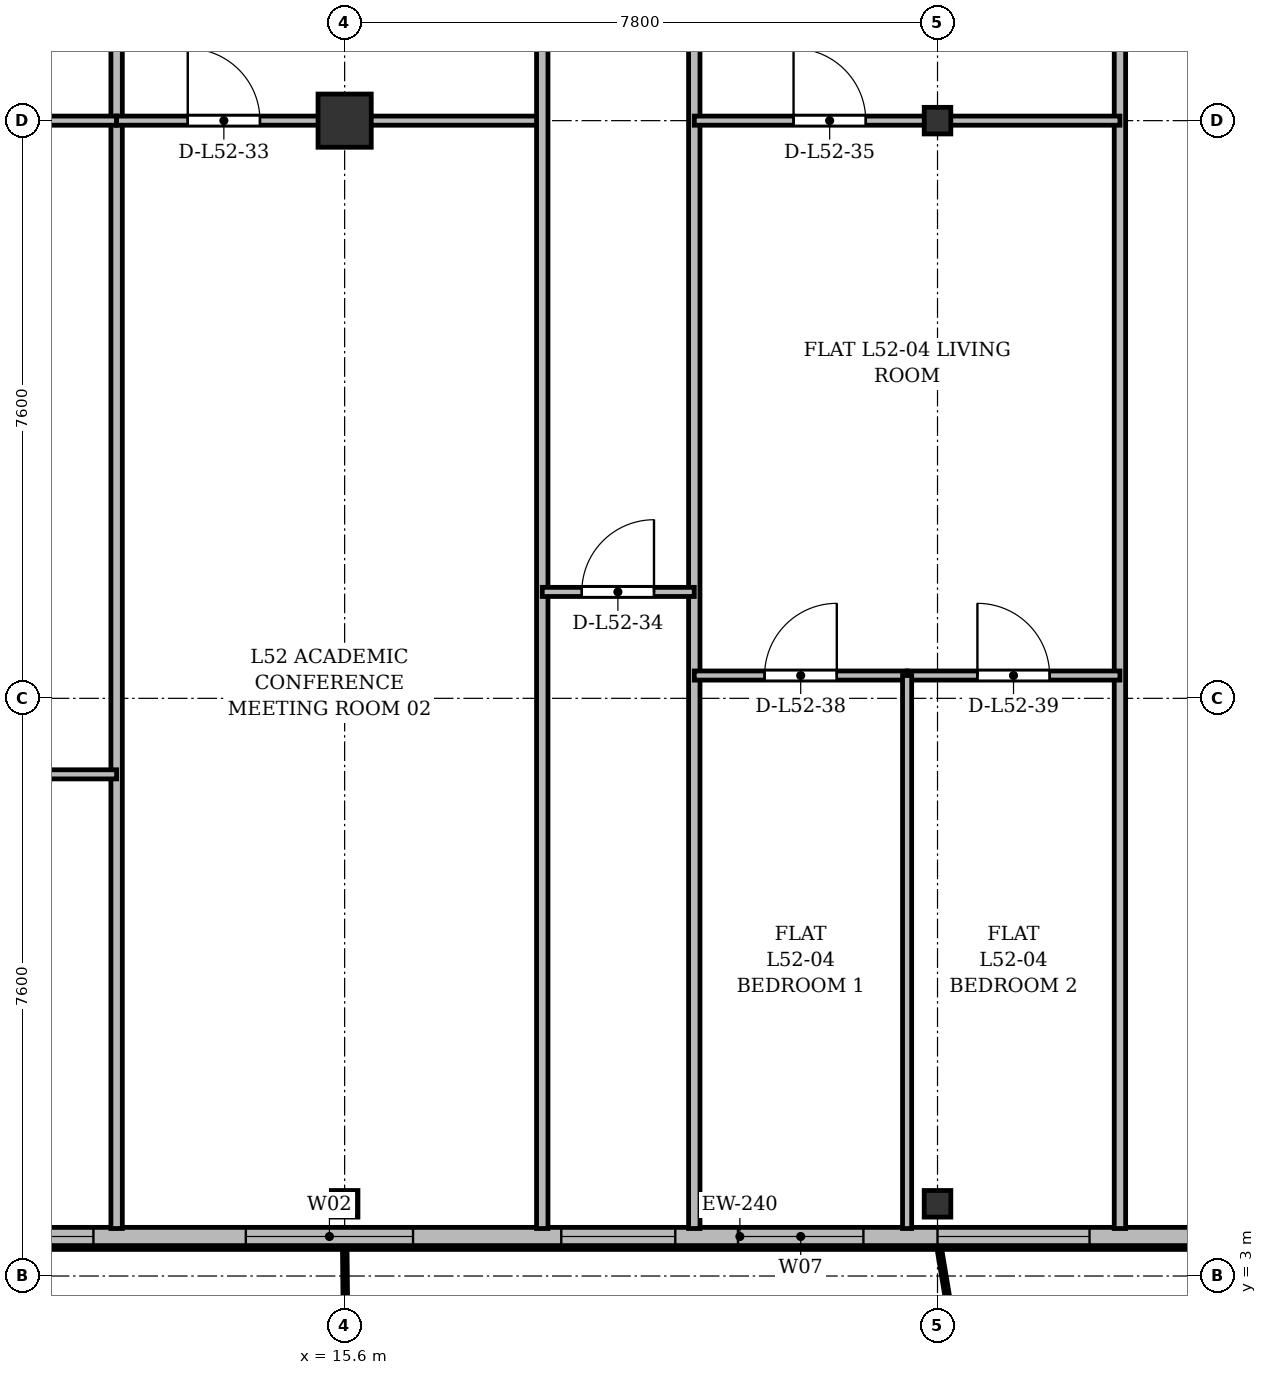
"""IFC4 building model, lengths in metres.
Left out: names, types, materials, properties, quantities, classifications, styles, units other than length and angle.
Written with IfcOpenShell. Run it as: python <this file> out.ifc"""

import sys

from ifc_helpers import new_model, si_unit, direction, frame, frame_2d, origin, origin_2d, place, context, subcontext, project, spatial, rectangle, i_section, extrude, source, transform, mapped, element, fill, save


model = new_model("IFC4")
c1 = context("Model", 3, precision=1e-05, world=origin(), true_north=direction((0.0, 1.0)))
c2 = subcontext(c1, "Body", "Model", "MODEL_VIEW")
j1 = project(units=[si_unit("LENGTHUNIT", "METRE"), si_unit("PLANEANGLEUNIT", "RADIAN")], contexts=[c1])
p1 = place(None, origin())
s1 = spatial("IfcSite", under=j1, at=p1, CompositionType="ELEMENT")
p2 = place(p1, origin())
s2 = spatial("IfcBuilding", under=s1, at=p2, CompositionType="ELEMENT")
p3 = place(p2, frame((0.0, 0.0, 201.3)))
s3 = spatial("IfcBuildingStorey", under=s2, at=p3, CompositionType="ELEMENT", Elevation=201.3)
m1 = source(origin(), c2, "Body", "SweptSolid", [
    extrude(i_section(OverallWidth=0.35, OverallDepth=0.35, WebThickness=0.018, FlangeThickness=0.028, at=origin_2d()), origin(), (0.0, 0.0, 1.0), 3.6),
])
p4 = place(p3, frame((15.6, 3.95, 0.0), z_axis=(0.0, 0.0, 1.0), x_axis=(1.0, 0.0, 0.0)))
e1 = element("IfcColumn", 1, at=p4, inside=s3, PredefinedType="COLUMN", context=c2, shape_type="MappedRepresentation", body=[
    mapped(m1, transform((0.0, 0.0, 0.0), x_axis=(1.0, 0.0, 0.0), y_axis=(0.0, 1.0, 0.0), z_axis=(0.0, 0.0, 1.0), scale=1.0)),
])
m2 = source(origin(), c2, "Body", "SweptSolid", [
    extrude(rectangle(XDim=0.7, YDim=0.7, at=origin_2d()), origin(), (0.0, 0.0, 1.0), 3.6),
])
p5 = place(p3, frame((15.6, 18.2, 0.0), z_axis=(0.0, 0.0, 1.0), x_axis=(1.0, 0.0, 0.0)))
e2 = element("IfcColumn", 2, at=p5, inside=s3, PredefinedType="COLUMN", context=c2, shape_type="MappedRepresentation", body=[
    mapped(m2, transform((0.0, 0.0, 0.0), x_axis=(1.0, 0.0, 0.0), y_axis=(0.0, 1.0, 0.0), z_axis=(0.0, 0.0, 1.0), scale=1.0)),
])
for number, where, z_axis, x_axis in (
    (3, (23.4, 3.95, 0.0), (0.0, 0.0, 1.0), (1.0, 0.0, 0.0)),
    (4, (23.4, 18.2, 0.0), (0.0, 0.0, 1.0), (1.0, 0.0, 0.0)),
):
    element("IfcColumn", number, at=place(p3, frame(where, z_axis=z_axis, x_axis=x_axis)), inside=s3, PredefinedType="COLUMN", context=c2, shape_type="MappedRepresentation", body=[
        mapped(m1, transform((0.0, 0.0, 0.0), x_axis=(1.0, 0.0, 0.0), y_axis=(0.0, 1.0, 0.0), z_axis=(0.0, 0.0, 1.0), scale=1.0)),
    ])
p6 = place(p3, frame((30.6, 3.52, 0.0), z_axis=(0.0, 0.0, 1.0), x_axis=(-1.0, 0.0, 0.0)))
e5 = element("IfcWall", 5, at=p6, inside=s3, PredefinedType="SOLIDWALL", context=c2, shape_type="SweptSolid", body=[
    extrude(rectangle(XDim=19.6, YDim=0.24, at=frame_2d((9.8, 0.0))), origin(), (0.0, 0.0, 1.0), 3.22),
])
p7 = place(p6, frame((1.695, 0.0, 0.9)))
e6 = element("IfcOpeningElement", 6, at=p7, cuts=e5, PredefinedType="OPENING", context=c2, shape_type="SweptSolid", body=[
    extrude(rectangle(XDim=1.5, YDim=1.75, at=frame_2d((0.75, 0.875))), frame((0.0, 0.13, 0.0), z_axis=(0.0, -1.0, 0.0), x_axis=(1.0, 0.0, 0.0)), (0.0, 0.0, 1.0), 0.26),
])
p8 = place(p6, frame((5.2, 0.0, 0.9)))
e7 = element("IfcOpeningElement", 7, at=p8, cuts=e5, PredefinedType="OPENING", context=c2, shape_type="SweptSolid", body=[
    extrude(rectangle(XDim=2.0, YDim=1.95, at=frame_2d((1.0, 0.975))), frame((0.0, 0.13, 0.0), z_axis=(0.0, -1.0, 0.0), x_axis=(1.0, 0.0, 0.0)), (0.0, 0.0, 1.0), 0.26),
])
p9 = place(p6, frame((8.175, 0.0, 0.9)))
e8 = element("IfcOpeningElement", 8, at=p9, cuts=e5, PredefinedType="OPENING", context=c2, shape_type="SweptSolid", body=[
    extrude(rectangle(XDim=1.65, YDim=1.85, at=frame_2d((0.825, 0.925))), frame((0.0, 0.13, 0.0), z_axis=(0.0, -1.0, 0.0), x_axis=(1.0, 0.0, 0.0)), (0.0, 0.0, 1.0), 0.26),
])
p10 = place(p6, frame((10.65, 0.0, 0.9)))
e9 = element("IfcOpeningElement", 9, at=p10, cuts=e5, PredefinedType="OPENING", context=c2, shape_type="SweptSolid", body=[
    extrude(rectangle(XDim=1.5, YDim=1.75, at=frame_2d((0.75, 0.875))), frame((0.0, 0.13, 0.0), z_axis=(0.0, -1.0, 0.0), x_axis=(1.0, 0.0, 0.0)), (0.0, 0.0, 1.0), 0.26),
])
p11 = place(p6, frame((14.1, 0.0, 0.9)))
e10 = element("IfcOpeningElement", 10, at=p11, cuts=e5, PredefinedType="OPENING", context=c2, shape_type="SweptSolid", body=[
    extrude(rectangle(XDim=2.2, YDim=1.8, at=frame_2d((1.1, 0.9))), frame((0.0, 0.13, 0.0), z_axis=(0.0, -1.0, 0.0), x_axis=(1.0, 0.0, 0.0)), (0.0, 0.0, 1.0), 0.26),
])
p12 = place(p6, frame((18.305, 0.0, 0.9)))
e11 = element("IfcOpeningElement", 11, at=p12, cuts=e5, PredefinedType="OPENING", context=c2, shape_type="SweptSolid", body=[
    extrude(rectangle(XDim=0.9, YDim=1.65, at=frame_2d((0.45, 0.825))), frame((0.0, 0.13, 0.0), z_axis=(0.0, -1.0, 0.0), x_axis=(1.0, 0.0, 0.0)), (0.0, 0.0, 1.0), 0.26),
])
for number, where, z_axis, x_axis in (
    (12, (12.6, 3.625, 0.0), (0.0, 0.0, 1.0), (0.0, 1.0, 0.0)),
    (13, (25.8, 3.625, 0.0), (0.0, 0.0, 1.0), (0.0, 1.0, 0.0)),
):
    element("IfcWall", number, at=place(p3, frame(where, z_axis=z_axis, x_axis=x_axis)), inside=s3, PredefinedType="PARTITIONING", context=c2, shape_type="SweptSolid", body=[
        extrude(rectangle(XDim=27.175, YDim=0.15, at=frame_2d((13.587, 0.0))), origin(), (0.0, 0.0, 1.0), 2.77),
    ])
p13 = place(p3, frame((8.24, 18.2, 0.0), z_axis=(0.0, 0.0, 1.0), x_axis=(1.0, 0.0, 0.0)))
e14 = element("IfcWall", 14, at=p13, inside=s3, PredefinedType="PARTITIONING", context=c2, shape_type="SweptSolid", body=[
    extrude(rectangle(XDim=4.36, YDim=0.12, at=frame_2d((2.18, 0.0))), origin(), (0.0, 0.0, 1.0), 2.77),
])
p14 = place(p13, frame((1.705, 0.0, 0.0)))
e15 = element("IfcOpeningElement", 15, at=p14, cuts=e14, PredefinedType="OPENING", context=c2, shape_type="SweptSolid", body=[
    extrude(rectangle(XDim=0.95, YDim=2.15, at=frame_2d((0.475, 1.075))), frame((0.0, 0.07, 0.0), z_axis=(0.0, -1.0, 0.0), x_axis=(1.0, 0.0, 0.0)), (0.0, 0.0, 1.0), 0.14),
])
p15 = place(p3, frame((8.24, 9.6, 0.0), z_axis=(0.0, 0.0, 1.0), x_axis=(1.0, 0.0, 0.0)))
e16 = element("IfcWall", 16, at=p15, inside=s3, PredefinedType="PARTITIONING", context=c2, shape_type="SweptSolid", body=[
    extrude(rectangle(XDim=4.36, YDim=0.12, at=frame_2d((2.18, 0.0))), origin(), (0.0, 0.0, 1.0), 2.72),
])
p16 = place(p15, frame((1.705, 0.0, 0.0)))
e17 = element("IfcOpeningElement", 17, at=p16, cuts=e16, PredefinedType="OPENING", context=c2, shape_type="SweptSolid", body=[
    extrude(rectangle(XDim=0.95, YDim=2.15, at=frame_2d((0.475, 1.075))), frame((0.0, 0.07, 0.0), z_axis=(0.0, -1.0, 0.0), x_axis=(1.0, 0.0, 0.0)), (0.0, 0.0, 1.0), 0.14),
])
p17 = place(p3, frame((12.6, 18.2, 0.0), z_axis=(0.0, 0.0, 1.0), x_axis=(1.0, 0.0, 0.0)))
e18 = element("IfcWall", 18, at=p17, inside=s3, PredefinedType="PARTITIONING", context=c2, shape_type="SweptSolid", body=[
    extrude(rectangle(XDim=5.6, YDim=0.12, at=frame_2d((2.8, 0.0))), origin(), (0.0, 0.0, 1.0), 2.77),
])
p18 = place(p17, frame((0.936, 0.0, 0.0)))
e19 = element("IfcOpeningElement", 19, at=p18, cuts=e18, PredefinedType="OPENING", context=c2, shape_type="SweptSolid", body=[
    extrude(rectangle(XDim=0.95, YDim=2.15, at=frame_2d((0.475, 1.075))), frame((0.0, 0.07, 0.0), z_axis=(0.0, -1.0, 0.0), x_axis=(1.0, 0.0, 0.0)), (0.0, 0.0, 1.0), 0.14),
])
for number, where, z_axis, x_axis in (
    (20, (18.2, 3.625, 0.0), (0.0, 0.0, 1.0), (0.0, 1.0, 0.0)),
    (21, (20.2, 3.625, 0.0), (0.0, 0.0, 1.0), (0.0, 1.0, 0.0)),
):
    element("IfcWall", number, at=place(p3, frame(where, z_axis=z_axis, x_axis=x_axis)), inside=s3, PredefinedType="PARTITIONING", context=c2, shape_type="SweptSolid", body=[
        extrude(rectangle(XDim=27.175, YDim=0.15, at=frame_2d((13.587, 0.0))), origin(), (0.0, 0.0, 1.0), 2.77),
    ])
p19 = place(p3, frame((18.2, 12.0, 0.0), z_axis=(0.0, 0.0, 1.0), x_axis=(1.0, 0.0, 0.0)))
e22 = element("IfcWall", 22, at=p19, inside=s3, PredefinedType="PARTITIONING", context=c2, shape_type="SweptSolid", body=[
    extrude(rectangle(XDim=2.0, YDim=0.12, at=frame_2d((1.0, 0.0))), origin(), (0.0, 0.0, 1.0), 3.22),
])
p20 = place(p19, frame((0.52, 0.0, 0.0)))
e23 = element("IfcOpeningElement", 23, at=p20, cuts=e22, PredefinedType="OPENING", context=c2, shape_type="SweptSolid", body=[
    extrude(rectangle(XDim=0.95, YDim=2.15, at=frame_2d((0.475, 1.075))), frame((0.0, 0.07, 0.0), z_axis=(0.0, -1.0, 0.0), x_axis=(1.0, 0.0, 0.0)), (0.0, 0.0, 1.0), 0.14),
])
p21 = place(p3, frame((20.2, 18.2, 0.0), z_axis=(0.0, 0.0, 1.0), x_axis=(1.0, 0.0, 0.0)))
e24 = element("IfcWall", 24, at=p21, inside=s3, PredefinedType="PARTITIONING", context=c2, shape_type="SweptSolid", body=[
    extrude(rectangle(XDim=5.6, YDim=0.12, at=frame_2d((2.8, 0.0))), origin(), (0.0, 0.0, 1.0), 2.77),
])
p22 = place(p21, frame((1.306, 0.0, 0.0)))
e25 = element("IfcOpeningElement", 25, at=p22, cuts=e24, PredefinedType="OPENING", context=c2, shape_type="SweptSolid", body=[
    extrude(rectangle(XDim=0.95, YDim=2.15, at=frame_2d((0.475, 1.075))), frame((0.0, 0.07, 0.0), z_axis=(0.0, -1.0, 0.0), x_axis=(1.0, 0.0, 0.0)), (0.0, 0.0, 1.0), 0.14),
])
p23 = place(p3, frame((20.2, 10.9, 0.0), z_axis=(0.0, 0.0, 1.0), x_axis=(1.0, 0.0, 0.0)))
e26 = element("IfcWall", 26, at=p23, inside=s3, PredefinedType="PARTITIONING", context=c2, shape_type="SweptSolid", body=[
    extrude(rectangle(XDim=2.8, YDim=0.12, at=frame_2d((1.4, 0.0))), origin(), (0.0, 0.0, 1.0), 2.92),
])
p24 = place(p23, frame((0.925, 0.0, 0.0)))
e27 = element("IfcOpeningElement", 27, at=p24, cuts=e26, PredefinedType="OPENING", context=c2, shape_type="SweptSolid", body=[
    extrude(rectangle(XDim=0.95, YDim=2.15, at=frame_2d((0.475, 1.075))), frame((0.0, 0.07, 0.0), z_axis=(0.0, -1.0, 0.0), x_axis=(1.0, 0.0, 0.0)), (0.0, 0.0, 1.0), 0.14),
])
p25 = place(p3, frame((23.0, 10.9, 0.0), z_axis=(0.0, 0.0, 1.0), x_axis=(1.0, 0.0, 0.0)))
e28 = element("IfcWall", 28, at=p25, inside=s3, PredefinedType="PARTITIONING", context=c2, shape_type="SweptSolid", body=[
    extrude(rectangle(XDim=2.8, YDim=0.12, at=frame_2d((1.4, 0.0))), origin(), (0.0, 0.0, 1.0), 2.72),
])
p26 = place(p25, frame((0.925, 0.0, 0.0)))
e29 = element("IfcOpeningElement", 29, at=p26, cuts=e28, PredefinedType="OPENING", context=c2, shape_type="SweptSolid", body=[
    extrude(rectangle(XDim=0.95, YDim=2.15, at=frame_2d((0.475, 1.075))), frame((0.0, 0.07, 0.0), z_axis=(0.0, -1.0, 0.0), x_axis=(1.0, 0.0, 0.0)), (0.0, 0.0, 1.0), 0.14),
])
p27 = place(p3, frame((23.0, 3.625, 0.0), z_axis=(0.0, 0.0, 1.0), x_axis=(0.0, 1.0, 0.0)))
e30 = element("IfcWall", 30, at=p27, inside=s3, PredefinedType="PARTITIONING", context=c2, shape_type="SweptSolid", body=[
    extrude(rectangle(XDim=7.275, YDim=0.12, at=frame_2d((3.637, 0.0))), origin(), (0.0, 0.0, 1.0), 2.77),
])
m3 = source(origin(), c2, "Body", "SweptSolid", [
    extrude(rectangle(XDim=2.0, YDim=1.95, at=frame_2d((1.0, 0.975))), frame((0.0, 0.03, 0.0), z_axis=(0.0, -1.0, 0.0), x_axis=(1.0, 0.0, 0.0)), (0.0, 0.0, 1.0), 0.06),
])
p28 = place(p8, origin())
e31 = element("IfcWindow", 31, at=p28, inside=s3, PartitioningType="SINGLE_PANEL", PredefinedType="WINDOW", context=c2, shape_type="MappedRepresentation", body=[
    mapped(m3, transform((0.0, 0.0, 0.0), x_axis=(1.0, 0.0, 0.0), y_axis=(0.0, 1.0, 0.0), z_axis=(0.0, 0.0, 1.0), scale=1.0)),
])
fill(e7, e31)
m4 = source(origin(), c2, "Body", "SweptSolid", [
    extrude(rectangle(XDim=1.65, YDim=1.85, at=frame_2d((0.825, 0.925))), frame((0.0, 0.03, 0.0), z_axis=(0.0, -1.0, 0.0), x_axis=(1.0, 0.0, 0.0)), (0.0, 0.0, 1.0), 0.06),
])
p29 = place(p9, origin())
e32 = element("IfcWindow", 32, at=p29, inside=s3, PartitioningType="SINGLE_PANEL", PredefinedType="WINDOW", context=c2, shape_type="MappedRepresentation", body=[
    mapped(m4, transform((0.0, 0.0, 0.0), x_axis=(1.0, 0.0, 0.0), y_axis=(0.0, 1.0, 0.0), z_axis=(0.0, 0.0, 1.0), scale=1.0)),
])
fill(e8, e32)
m5 = source(origin(), c2, "Body", "SweptSolid", [
    extrude(rectangle(XDim=1.5, YDim=1.75, at=frame_2d((0.75, 0.875))), frame((0.0, 0.03, 0.0), z_axis=(0.0, -1.0, 0.0), x_axis=(1.0, 0.0, 0.0)), (0.0, 0.0, 1.0), 0.06),
])
p30 = place(p10, origin())
e33 = element("IfcWindow", 33, at=p30, inside=s3, PartitioningType="SINGLE_PANEL", PredefinedType="WINDOW", context=c2, shape_type="MappedRepresentation", body=[
    mapped(m5, transform((0.0, 0.0, 0.0), x_axis=(1.0, 0.0, 0.0), y_axis=(0.0, 1.0, 0.0), z_axis=(0.0, 0.0, 1.0), scale=1.0)),
])
fill(e9, e33)
m6 = source(origin(), c2, "Body", "SweptSolid", [
    extrude(rectangle(XDim=2.2, YDim=1.8, at=frame_2d((1.1, 0.9))), frame((0.0, 0.03, 0.0), z_axis=(0.0, -1.0, 0.0), x_axis=(1.0, 0.0, 0.0)), (0.0, 0.0, 1.0), 0.06),
])
p31 = place(p11, origin())
e34 = element("IfcWindow", 34, at=p31, inside=s3, PartitioningType="SINGLE_PANEL", PredefinedType="WINDOW", context=c2, shape_type="MappedRepresentation", body=[
    mapped(m6, transform((0.0, 0.0, 0.0), x_axis=(1.0, 0.0, 0.0), y_axis=(0.0, 1.0, 0.0), z_axis=(0.0, 0.0, 1.0), scale=1.0)),
])
fill(e10, e34)
m7 = source(origin(), c2, "Body", "SweptSolid", [
    extrude(rectangle(XDim=0.9, YDim=1.65, at=frame_2d((0.45, 0.825))), frame((0.0, 0.03, 0.0), z_axis=(0.0, -1.0, 0.0), x_axis=(1.0, 0.0, 0.0)), (0.0, 0.0, 1.0), 0.06),
])
p32 = place(p12, origin())
e35 = element("IfcWindow", 35, at=p32, inside=s3, PartitioningType="SINGLE_PANEL", PredefinedType="WINDOW", context=c2, shape_type="MappedRepresentation", body=[
    mapped(m7, transform((0.0, 0.0, 0.0), x_axis=(1.0, 0.0, 0.0), y_axis=(0.0, 1.0, 0.0), z_axis=(0.0, 0.0, 1.0), scale=1.0)),
])
fill(e11, e35)
m8 = source(origin(), c2, "Body", "SweptSolid", [
    extrude(rectangle(XDim=0.95, YDim=2.15, at=frame_2d((0.475, 1.075))), frame((0.0, 0.025, 0.0), z_axis=(0.0, -1.0, 0.0), x_axis=(1.0, 0.0, 0.0)), (0.0, 0.0, 1.0), 0.05),
])
p33 = place(p18, origin())
e36 = element("IfcDoor", 36, at=p33, inside=s3, OperationType="SINGLE_SWING_LEFT", PredefinedType="DOOR", context=c2, shape_type="MappedRepresentation", body=[
    mapped(m8, transform((0.0, 0.0, 0.0), x_axis=(1.0, 0.0, 0.0), y_axis=(0.0, 1.0, 0.0), z_axis=(0.0, 0.0, 1.0), scale=1.0)),
])
fill(e19, e36)
p34 = place(p20, origin())
e37 = element("IfcDoor", 37, at=p34, inside=s3, OperationType="SINGLE_SWING_RIGHT", PredefinedType="DOOR", context=c2, shape_type="MappedRepresentation", body=[
    mapped(m8, transform((0.0, 0.0, 0.0), x_axis=(1.0, 0.0, 0.0), y_axis=(0.0, 1.0, 0.0), z_axis=(0.0, 0.0, 1.0), scale=1.0)),
])
fill(e23, e37)
p35 = place(p22, origin())
e38 = element("IfcDoor", 38, at=p35, inside=s3, OperationType="SINGLE_SWING_LEFT", PredefinedType="DOOR", context=c2, shape_type="MappedRepresentation", body=[
    mapped(m8, transform((0.0, 0.0, 0.0), x_axis=(1.0, 0.0, 0.0), y_axis=(0.0, 1.0, 0.0), z_axis=(0.0, 0.0, 1.0), scale=1.0)),
])
fill(e25, e38)
p36 = place(p24, origin())
e39 = element("IfcDoor", 39, at=p36, inside=s3, OperationType="SINGLE_SWING_RIGHT", PredefinedType="DOOR", context=c2, shape_type="MappedRepresentation", body=[
    mapped(m8, transform((0.0, 0.0, 0.0), x_axis=(1.0, 0.0, 0.0), y_axis=(0.0, 1.0, 0.0), z_axis=(0.0, 0.0, 1.0), scale=1.0)),
])
fill(e27, e39)
p37 = place(p26, origin())
e40 = element("IfcDoor", 40, at=p37, inside=s3, OperationType="SINGLE_SWING_LEFT", PredefinedType="DOOR", context=c2, shape_type="MappedRepresentation", body=[
    mapped(m8, transform((0.0, 0.0, 0.0), x_axis=(1.0, 0.0, 0.0), y_axis=(0.0, 1.0, 0.0), z_axis=(0.0, 0.0, 1.0), scale=1.0)),
])
fill(e29, e40)
save(model, sys.argv[1])
